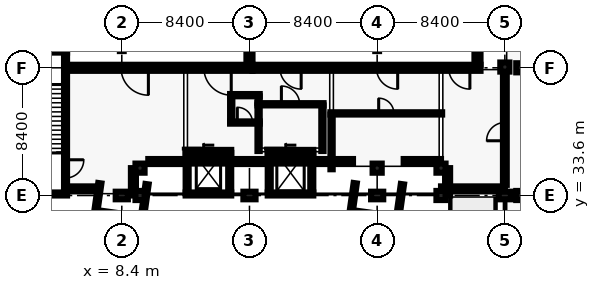
"""IFC4 building model, lengths in metres.
Left out: names, types, materials, properties, quantities, classifications, styles, units other than length and angle.
Written with IfcOpenShell. Run it as: python <this file> out.ifc"""

import sys

from ifc_helpers import new_model, si_unit, direction, frame, frame_2d, origin, origin_2d, place, context, subcontext, project, spatial, rectangle, extrude, element, fill, save


model = new_model("IFC4")
c1 = context("Model", 3, precision=1e-05, world=origin(), true_north=direction((0.0, 1.0)))
c2 = subcontext(c1, "Body", "Model", "MODEL_VIEW")
j1 = project(units=[si_unit("LENGTHUNIT", "METRE"), si_unit("PLANEANGLEUNIT", "RADIAN")], contexts=[c1])
p1 = place(None, origin())
s1 = spatial("IfcSite", under=j1, at=p1, CompositionType="ELEMENT")
p2 = place(p1, origin())
s2 = spatial("IfcBuilding", under=s1, at=p2, CompositionType="ELEMENT")
p3 = place(p2, frame((0.0, 0.0, 10.2)))
s3 = spatial("IfcBuildingStorey", under=s2, at=p3, CompositionType="ELEMENT", Elevation=10.2)
p4 = place(p3, frame((4.8, 33.7, 0.0), z_axis=(0.0, 0.0, 1.0), x_axis=(-1.0, 0.0, 0.0)))
e1 = element("IfcWall", 1, at=p4, inside=s3, PredefinedType="SHEAR", context=c2, shape_type="SweptSolid", body=[
    extrude(rectangle(XDim=4.8, YDim=0.2, at=frame_2d((2.4, 0.0))), origin(), (0.0, 0.0, 1.0), 4.8),
])
p5 = place(p3, frame((4.7, 43.0, 0.0), z_axis=(0.0, 0.0, 1.0), x_axis=(0.0, -1.0, 0.0)))
e2 = element("IfcWall", 2, at=p5, inside=s3, PredefinedType="SHEAR", context=c2, shape_type="SweptSolid", body=[
    extrude(rectangle(XDim=9.2, YDim=0.2, at=frame_2d((4.6, 0.0))), origin(), (0.0, 0.0, 1.0), 4.8),
])
p6 = place(p5, frame((7.05, 0.0, 0.0)))
e3 = element("IfcOpeningElement", 3, at=p6, cuts=e2, PredefinedType="OPENING", context=c2, shape_type="SweptSolid", body=[
    extrude(rectangle(XDim=1.2, YDim=2.1, at=frame_2d((0.6, 1.05))), frame((0.0, 0.11, 0.0), z_axis=(0.0, -1.0, 0.0), x_axis=(1.0, 0.0, 0.0)), (0.0, 0.0, 1.0), 0.22),
])
p7 = place(p3, frame((15.6, 33.7, 0.0), z_axis=(0.0, 0.0, 1.0), x_axis=(-1.0, 0.0, 0.0)))
e4 = element("IfcWall", 4, at=p7, inside=s3, PredefinedType="SHEAR", context=c2, shape_type="SweptSolid", body=[
    extrude(rectangle(XDim=3.0, YDim=0.2, at=frame_2d((1.5, 0.0))), origin(), (0.0, 0.0, 1.0), 4.8),
])
p8 = place(p3, frame((12.6, 36.5, 0.0), z_axis=(0.0, 0.0, 1.0), x_axis=(1.0, 0.0, 0.0)))
e5 = element("IfcWall", 5, at=p8, inside=s3, PredefinedType="SHEAR", context=c2, shape_type="SweptSolid", body=[
    extrude(rectangle(XDim=3.0, YDim=0.2, at=frame_2d((1.5, 0.0))), origin(), (0.0, 0.0, 1.0), 4.8),
])
p9 = place(p8, frame((0.95, 0.0, 0.0)))
e6 = element("IfcOpeningElement", 6, at=p9, cuts=e5, PredefinedType="OPENING", context=c2, shape_type="SweptSolid", body=[
    extrude(rectangle(XDim=1.1, YDim=2.1, at=frame_2d((0.55, 1.05))), frame((0.0, 0.11, 0.0), z_axis=(0.0, -1.0, 0.0), x_axis=(1.0, 0.0, 0.0)), (0.0, 0.0, 1.0), 0.22),
])
for number, where, z_axis, x_axis in (
    (7, (12.7, 33.8, 0.0), (0.0, 0.0, 1.0), (0.0, 1.0, 0.0)),
    (8, (15.5, 36.4, 0.0), (0.0, 0.0, 1.0), (0.0, -1.0, 0.0)),
):
    element("IfcWall", number, at=place(p3, frame(where, z_axis=z_axis, x_axis=x_axis)), inside=s3, PredefinedType="SHEAR", context=c2, shape_type="SweptSolid", body=[
        extrude(rectangle(XDim=2.6, YDim=0.2, at=frame_2d((1.3, 0.0))), origin(), (0.0, 0.0, 1.0), 4.8),
    ])
p10 = place(p3, frame((21.0, 33.7, 0.0), z_axis=(0.0, 0.0, 1.0), x_axis=(-1.0, 0.0, 0.0)))
e9 = element("IfcWall", 9, at=p10, inside=s3, PredefinedType="SHEAR", context=c2, shape_type="SweptSolid", body=[
    extrude(rectangle(XDim=3.0, YDim=0.2, at=frame_2d((1.5, 0.0))), origin(), (0.0, 0.0, 1.0), 4.8),
])
p11 = place(p3, frame((18.0, 36.5, 0.0), z_axis=(0.0, 0.0, 1.0), x_axis=(1.0, 0.0, 0.0)))
e10 = element("IfcWall", 10, at=p11, inside=s3, PredefinedType="SHEAR", context=c2, shape_type="SweptSolid", body=[
    extrude(rectangle(XDim=3.0, YDim=0.2, at=frame_2d((1.5, 0.0))), origin(), (0.0, 0.0, 1.0), 4.8),
])
p12 = place(p11, frame((0.95, 0.0, 0.0)))
e11 = element("IfcOpeningElement", 11, at=p12, cuts=e10, PredefinedType="OPENING", context=c2, shape_type="SweptSolid", body=[
    extrude(rectangle(XDim=1.1, YDim=2.1, at=frame_2d((0.55, 1.05))), frame((0.0, 0.11, 0.0), z_axis=(0.0, -1.0, 0.0), x_axis=(1.0, 0.0, 0.0)), (0.0, 0.0, 1.0), 0.22),
])
for number, where, z_axis, x_axis in (
    (12, (18.1, 33.8, 0.0), (0.0, 0.0, 1.0), (0.0, 1.0, 0.0)),
    (13, (20.9, 36.4, 0.0), (0.0, 0.0, 1.0), (0.0, -1.0, 0.0)),
):
    element("IfcWall", number, at=place(p3, frame(where, z_axis=z_axis, x_axis=x_axis)), inside=s3, PredefinedType="SHEAR", context=c2, shape_type="SweptSolid", body=[
        extrude(rectangle(XDim=2.6, YDim=0.2, at=frame_2d((1.3, 0.0))), origin(), (0.0, 0.0, 1.0), 4.8),
    ])
p13 = place(p3, frame((17.0, 42.0, 0.0), z_axis=(0.0, 0.0, 1.0), x_axis=(-1.0, 0.0, 0.0)))
e14 = element("IfcWall", 14, at=p13, inside=s3, PredefinedType="SHEAR", context=c2, shape_type="SweptSolid", body=[
    extrude(rectangle(XDim=12.2, YDim=0.4, at=frame_2d((6.1, 0.0))), origin(), (0.0, 0.0, 1.0), 4.8),
])
p14 = place(p13, frame((6.85, 0.0, 0.0)))
e15 = element("IfcOpeningElement", 15, at=p14, cuts=e14, PredefinedType="OPENING", context=c2, shape_type="SweptSolid", body=[
    extrude(rectangle(XDim=1.8, YDim=2.1, at=frame_2d((0.9, 1.05))), frame((0.0, 0.21, 0.0), z_axis=(0.0, -1.0, 0.0), x_axis=(1.0, 0.0, 0.0)), (0.0, 0.0, 1.0), 0.42),
])
p15 = place(p13, frame((1.4, 0.0, 0.0)))
e16 = element("IfcOpeningElement", 16, at=p15, cuts=e14, PredefinedType="OPENING", context=c2, shape_type="SweptSolid", body=[
    extrude(rectangle(XDim=1.8, YDim=2.1, at=frame_2d((0.9, 1.05))), frame((0.0, 0.21, 0.0), z_axis=(0.0, -1.0, 0.0), x_axis=(1.0, 0.0, 0.0)), (0.0, 0.0, 1.0), 0.42),
])
p16 = place(p3, frame((16.8, 58.6, 0.0), z_axis=(0.0, 0.0, 1.0), x_axis=(0.0, -1.0, 0.0)))
e17 = element("IfcWall", 17, at=p16, inside=s3, PredefinedType="SHEAR", context=c2, shape_type="SweptSolid", body=[
    extrude(rectangle(XDim=16.4, YDim=0.4, at=frame_2d((8.2, 0.0))), origin(), (0.0, 0.0, 1.0), 4.8),
])
p17 = place(p3, frame((32.0, 42.0, 0.0), z_axis=(0.0, 0.0, 1.0), x_axis=(-1.0, 0.0, 0.0)))
e18 = element("IfcWall", 18, at=p17, inside=s3, PredefinedType="SHEAR", context=c2, shape_type="SweptSolid", body=[
    extrude(rectangle(XDim=15.0, YDim=0.4, at=frame_2d((7.5, 0.0))), origin(), (0.0, 0.0, 1.0), 4.8),
])
p18 = place(p17, frame((0.7, 0.0, 0.0)))
e19 = element("IfcOpeningElement", 19, at=p18, cuts=e18, PredefinedType="OPENING", context=c2, shape_type="SweptSolid", body=[
    extrude(rectangle(XDim=1.4, YDim=2.1, at=frame_2d((0.7, 1.05))), frame((0.0, 0.21, 0.0), z_axis=(0.0, -1.0, 0.0), x_axis=(1.0, 0.0, 0.0)), (0.0, 0.0, 1.0), 0.42),
])
p19 = place(p17, frame((11.8, 0.0, 0.0)))
e20 = element("IfcOpeningElement", 20, at=p19, cuts=e18, PredefinedType="OPENING", context=c2, shape_type="SweptSolid", body=[
    extrude(rectangle(XDim=1.4, YDim=2.1, at=frame_2d((0.7, 1.05))), frame((0.0, 0.21, 0.0), z_axis=(0.0, -1.0, 0.0), x_axis=(1.0, 0.0, 0.0)), (0.0, 0.0, 1.0), 0.42),
])
p20 = place(p17, frame((5.45, 0.0, 0.0)))
e21 = element("IfcOpeningElement", 21, at=p20, cuts=e18, PredefinedType="OPENING", context=c2, shape_type="SweptSolid", body=[
    extrude(rectangle(XDim=1.4, YDim=2.1, at=frame_2d((0.7, 1.05))), frame((0.0, 0.21, 0.0), z_axis=(0.0, -1.0, 0.0), x_axis=(1.0, 0.0, 0.0)), (0.0, 0.0, 1.0), 0.42),
])
p21 = place(p3, frame((31.8, 57.6, 0.0), z_axis=(0.0, 0.0, 1.0), x_axis=(0.0, -1.0, 0.0)))
e22 = element("IfcWall", 22, at=p21, inside=s3, PredefinedType="SHEAR", context=c2, shape_type="SweptSolid", body=[
    extrude(rectangle(XDim=15.4, YDim=0.4, at=frame_2d((7.7, 0.0))), origin(), (0.0, 0.0, 1.0), 4.8),
])
for number, where, z_axis, x_axis in (
    (23, (8.4, 33.6, 0.0), (0.0, 0.0, 1.0), (1.0, 0.0, 0.0)),
    (24, (16.8, 33.6, 0.0), (0.0, 0.0, 1.0), (1.0, 0.0, 0.0)),
    (25, (25.2, 33.6, 0.0), (0.0, 0.0, 1.0), (1.0, 0.0, 0.0)),
    (26, (33.6, 33.6, 0.0), (0.0, 0.0, 1.0), (1.0, 0.0, 0.0)),
):
    element("IfcColumn", number, at=place(p3, frame(where, z_axis=z_axis, x_axis=x_axis)), inside=s3, PredefinedType="COLUMN", context=c2, shape_type="SweptSolid", body=[
        extrude(rectangle(XDim=0.8, YDim=0.5, at=origin_2d()), origin(), (0.0, 0.0, 1.0), 4.8),
    ])
for number, where, z_axis, x_axis in (
    (27, (34.65, 33.6, 0.0), (0.0, 0.0, 1.0), (1.0, 0.0, 0.0)),
    (28, (34.65, 42.0, 0.0), (0.0, 0.0, 1.0), (1.0, 0.0, 0.0)),
    (29, (33.6, 42.05, 0.0), (0.0, 0.0, 1.0), (1.0, 0.0, 0.0)),
    (30, (9.6, 35.4, 0.0), (0.0, 0.0, 1.0), (1.0, 0.0, 0.0)),
    (31, (9.601, 33.6, 0.0), (0.0, 0.0, 1.0), (1.0, 0.0, 0.0)),
    (32, (25.2, 35.399, 0.0), (0.0, 0.0, 1.0), (1.0, 0.0, 0.0)),
    (33, (29.399, 33.6, 0.0), (0.0, 0.0, 1.0), (1.0, 0.0, 0.0)),
    (34, (29.4, 35.4, 0.0), (0.0, 0.0, 1.0), (1.0, 0.0, 0.0)),
):
    element("IfcColumn", number, at=place(p3, frame(where, z_axis=z_axis, x_axis=x_axis)), inside=s3, PredefinedType="COLUMN", context=c2, shape_type="SweptSolid", body=[
        extrude(rectangle(XDim=0.6, YDim=0.6, at=origin_2d()), origin(), (0.0, 0.0, 1.0), 4.8),
    ])
p22 = place(p3, frame((6.956, 34.409, 0.0), z_axis=(0.0, 0.0, 1.0), x_axis=(-0.13918000587, -0.990267098295, 0.0)))
e35 = element("IfcWall", 35, at=p22, inside=s3, PredefinedType="SOLIDWALL", context=c2, shape_type="SweptSolid", body=[
    extrude(rectangle(XDim=1.8, YDim=0.215, at=frame_2d((0.9, 0.0))), origin(), (0.0, 0.0, 1.0), 4.5),
])
p23 = place(p3, frame((10.062, 34.345, 0.0), z_axis=(0.0, 0.0, 1.0), x_axis=(-0.139230687381, -0.99025997379, 0.0)))
e36 = element("IfcWall", 36, at=p23, inside=s3, PredefinedType="SOLIDWALL", context=c2, shape_type="SweptSolid", body=[
    extrude(rectangle(XDim=2.169, YDim=0.215, at=frame_2d((1.084, 0.0))), origin(), (0.0, 0.0, 1.0), 4.5),
])
p24 = place(p3, frame((23.756, 34.409, 0.0), z_axis=(0.0, 0.0, 1.0), x_axis=(-0.13918000587, -0.990267098295, 0.0)))
e37 = element("IfcWall", 37, at=p24, inside=s3, PredefinedType="SOLIDWALL", context=c2, shape_type="SweptSolid", body=[
    extrude(rectangle(XDim=1.8, YDim=0.215, at=frame_2d((0.9, 0.0))), origin(), (0.0, 0.0, 1.0), 4.5),
])
p25 = place(p3, frame((26.862, 34.345, 0.0), z_axis=(0.0, 0.0, 1.0), x_axis=(-0.139120311566, -0.990275486372, 0.0)))
e38 = element("IfcWall", 38, at=p25, inside=s3, PredefinedType="SOLIDWALL", context=c2, shape_type="SweptSolid", body=[
    extrude(rectangle(XDim=2.169, YDim=0.215, at=frame_2d((1.084, 0.0))), origin(), (0.0, 0.0, 1.0), 4.5),
])
p26 = place(p3, frame((6.776, 34.05, 0.0), z_axis=(0.0, 0.0, 1.0), x_axis=(-1.0, 0.0, 0.0)))
e39 = element("IfcWall", 39, at=p26, inside=s3, PredefinedType="SOLIDWALL", context=c2, shape_type="SweptSolid", body=[
    extrude(rectangle(XDim=1.976, YDim=0.3, at=frame_2d((0.988, 0.0))), origin(), (0.0, 0.0, 1.0), 4.5),
])
p27 = place(p3, frame((9.15, 35.4, 0.0), z_axis=(0.0, 0.0, 1.0), x_axis=(0.0, -1.0, 0.0)))
e40 = element("IfcWall", 40, at=p27, inside=s3, PredefinedType="SOLIDWALL", context=c2, shape_type="SweptSolid", body=[
    extrude(rectangle(XDim=1.8, YDim=0.3, at=frame_2d((0.9, 0.0))), origin(), (0.0, 0.0, 1.0), 4.5),
])
p28 = place(p3, frame((23.611, 35.85, 0.0), z_axis=(0.0, 0.0, 1.0), x_axis=(-1.0, 0.0, 0.0)))
e41 = element("IfcWall", 41, at=p28, inside=s3, PredefinedType="SOLIDWALL", context=c2, shape_type="SweptSolid", body=[
    extrude(rectangle(XDim=13.468, YDim=0.3, at=frame_2d((6.734, 0.0))), origin(), (0.0, 0.0, 1.0), 4.5),
])
p29 = place(p3, frame((29.4, 35.85, 0.0), z_axis=(0.0, 0.0, 1.0), x_axis=(-1.0, 0.0, 0.0)))
e42 = element("IfcWall", 42, at=p29, inside=s3, PredefinedType="SOLIDWALL", context=c2, shape_type="SweptSolid", body=[
    extrude(rectangle(XDim=2.456, YDim=0.3, at=frame_2d((1.228, 0.0))), origin(), (0.0, 0.0, 1.0), 4.5),
])
p30 = place(p3, frame((29.85, 33.6, 0.0), z_axis=(0.0, 0.0, 1.0), x_axis=(0.0, 1.0, 0.0)))
e43 = element("IfcWall", 43, at=p30, inside=s3, PredefinedType="SOLIDWALL", context=c2, shape_type="SweptSolid", body=[
    extrude(rectangle(XDim=1.8, YDim=0.3, at=frame_2d((0.9, 0.0))), origin(), (0.0, 0.0, 1.0), 4.5),
])
p31 = place(p3, frame((33.6, 34.05, 0.0), z_axis=(0.0, 0.0, 1.0), x_axis=(-1.0, 0.0, 0.0)))
e44 = element("IfcWall", 44, at=p31, inside=s3, PredefinedType="SOLIDWALL", context=c2, shape_type="SweptSolid", body=[
    extrude(rectangle(XDim=4.2, YDim=0.3, at=frame_2d((2.1, 0.0))), origin(), (0.0, 0.0, 1.0), 4.5),
])
p32 = place(p3, frame((33.6, 34.3, 0.0), z_axis=(0.0, 0.0, 1.0), x_axis=(0.0, 1.0, 0.0)))
e45 = element("IfcWall", 45, at=p32, inside=s3, PredefinedType="SOLIDWALL", context=c2, shape_type="SweptSolid", body=[
    extrude(rectangle(XDim=7.825, YDim=0.25, at=frame_2d((3.913, 0.0))), origin(), (0.0, 0.0, 1.0), 3.8),
])
p33 = place(p32, frame((2.9, 0.0, 0.0)))
e46 = element("IfcOpeningElement", 46, at=p33, cuts=e45, PredefinedType="OPENING", context=c2, shape_type="SweptSolid", body=[
    extrude(rectangle(XDim=1.2, YDim=2.1, at=frame_2d((0.6, 1.05))), frame((0.0, 0.135, 0.0), z_axis=(0.0, -1.0, 0.0), x_axis=(1.0, 0.0, 0.0)), (0.0, 0.0, 1.0), 0.27),
])
p34 = place(p3, frame((15.525, 38.4, 0.0), z_axis=(0.0, 0.0, 1.0), x_axis=(1.0, 0.0, 0.0)))
e47 = element("IfcWall", 47, at=p34, inside=s3, PredefinedType="PARTITIONING", context=c2, shape_type="SweptSolid", body=[
    extrude(rectangle(XDim=1.95, YDim=0.15, at=frame_2d((0.975, 0.0))), origin(), (0.0, 0.0, 1.0), 3.8),
])
p35 = place(p34, frame((0.475, 0.0, 0.0)))
e48 = element("IfcOpeningElement", 48, at=p35, cuts=e47, PredefinedType="OPENING", context=c2, shape_type="SweptSolid", body=[
    extrude(rectangle(XDim=1.0, YDim=2.1, at=frame_2d((0.5, 1.05))), frame((0.0, 0.085, 0.0), z_axis=(0.0, -1.0, 0.0), x_axis=(1.0, 0.0, 0.0)), (0.0, 0.0, 1.0), 0.17),
])
p36 = place(p3, frame((22.125, 39.0, 0.0), z_axis=(0.0, 0.0, 1.0), x_axis=(1.0, 0.0, 0.0)))
e49 = element("IfcWall", 49, at=p36, inside=s3, PredefinedType="PARTITIONING", context=c2, shape_type="SweptSolid", body=[
    extrude(rectangle(XDim=7.35, YDim=0.15, at=frame_2d((3.675, 0.0))), origin(), (0.0, 0.0, 1.0), 3.8),
])
p37 = place(p36, frame((3.175, 0.0, 0.0)))
e50 = element("IfcOpeningElement", 50, at=p37, cuts=e49, PredefinedType="OPENING", context=c2, shape_type="SweptSolid", body=[
    extrude(rectangle(XDim=1.0, YDim=2.1, at=frame_2d((0.5, 1.05))), frame((0.0, 0.085, 0.0), z_axis=(0.0, -1.0, 0.0), x_axis=(1.0, 0.0, 0.0)), (0.0, 0.0, 1.0), 0.17),
])
p38 = place(p3, frame((15.525, 40.2, 0.0), z_axis=(0.0, 0.0, 1.0), x_axis=(1.0, 0.0, 0.0)))
e51 = element("IfcWall", 51, at=p38, inside=s3, PredefinedType="PARTITIONING", context=c2, shape_type="SweptSolid", body=[
    extrude(rectangle(XDim=1.95, YDim=0.15, at=frame_2d((0.975, 0.0))), origin(), (0.0, 0.0, 1.0), 3.8),
])
p39 = place(p3, frame((17.325, 39.6, 0.0), z_axis=(0.0, 0.0, 1.0), x_axis=(1.0, 0.0, 0.0)))
e52 = element("IfcWall", 52, at=p39, inside=s3, PredefinedType="SOLIDWALL", context=c2, shape_type="SweptSolid", body=[
    extrude(rectangle(XDim=4.35, YDim=0.15, at=frame_2d((2.175, 0.0))), origin(), (0.0, 0.0, 1.0), 3.8),
])
p40 = place(p39, frame((1.575, 0.0, 0.0)))
e53 = element("IfcOpeningElement", 53, at=p40, cuts=e52, PredefinedType="OPENING", context=c2, shape_type="SweptSolid", body=[
    extrude(rectangle(XDim=1.2, YDim=2.1, at=frame_2d((0.6, 1.05))), frame((0.0, 0.085, 0.0), z_axis=(0.0, -1.0, 0.0), x_axis=(1.0, 0.0, 0.0)), (0.0, 0.0, 1.0), 0.17),
])
p41 = place(p3, frame((15.6, 38.475, 0.0), z_axis=(0.0, 0.0, 1.0), x_axis=(0.0, 1.0, 0.0)))
e54 = element("IfcWall", 54, at=p41, inside=s3, PredefinedType="PARTITIONING", context=c2, shape_type="SweptSolid", body=[
    extrude(rectangle(XDim=1.65, YDim=0.15, at=frame_2d((0.825, 0.0))), origin(), (0.0, 0.0, 1.0), 4.5),
])
p42 = place(p3, frame((17.4, 39.675, 0.0), z_axis=(0.0, 0.0, 1.0), x_axis=(0.0, 1.0, 0.0)))
e55 = element("IfcWall", 55, at=p42, inside=s3, PredefinedType="PARTITIONING", context=c2, shape_type="SweptSolid", body=[
    extrude(rectangle(XDim=0.45, YDim=0.15, at=frame_2d((0.225, 0.0))), origin(), (0.0, 0.0, 1.0), 4.5),
])
p43 = place(p3, frame((22.2, 35.325, 0.0), z_axis=(0.0, 0.0, 1.0), x_axis=(0.0, 1.0, 0.0)))
e56 = element("IfcWall", 56, at=p43, inside=s3, PredefinedType="PARTITIONING", context=c2, shape_type="SweptSolid", body=[
    extrude(rectangle(XDim=0.375, YDim=0.15, at=frame_2d((0.188, 0.0))), origin(), (0.0, 0.0, 1.0), 4.0),
])
p44 = place(p3, frame((22.2, 36.0, 0.0), z_axis=(0.0, 0.0, 1.0), x_axis=(0.0, 1.0, 0.0)))
e57 = element("IfcWall", 57, at=p44, inside=s3, PredefinedType="PARTITIONING", context=c2, shape_type="SweptSolid", body=[
    extrude(rectangle(XDim=2.925, YDim=0.15, at=frame_2d((1.462, 0.0))), origin(), (0.0, 0.0, 1.0), 4.5),
])
p45 = place(p3, frame((17.4, 36.525, 0.0), z_axis=(0.0, 0.0, 1.0), x_axis=(0.0, 1.0, 0.0)))
e58 = element("IfcWall", 58, at=p45, inside=s3, PredefinedType="SOLIDWALL", context=c2, shape_type="SweptSolid", body=[
    extrude(rectangle(XDim=1.8, YDim=0.15, at=frame_2d((0.9, 0.0))), origin(), (0.0, 0.0, 1.0), 4.5),
])
p46 = place(p3, frame((17.4, 38.475, 0.0), z_axis=(0.0, 0.0, 1.0), x_axis=(0.0, 1.0, 0.0)))
e59 = element("IfcWall", 59, at=p46, inside=s3, PredefinedType="SOLIDWALL", context=c2, shape_type="SweptSolid", body=[
    extrude(rectangle(XDim=1.05, YDim=0.15, at=frame_2d((0.525, 0.0))), origin(), (0.0, 0.0, 1.0), 4.5),
])
p47 = place(p3, frame((21.6, 36.525, 0.0), z_axis=(0.0, 0.0, 1.0), x_axis=(0.0, 1.0, 0.0)))
e60 = element("IfcWall", 60, at=p47, inside=s3, PredefinedType="SOLIDWALL", context=c2, shape_type="SweptSolid", body=[
    extrude(rectangle(XDim=3.0, YDim=0.15, at=frame_2d((1.5, 0.0))), origin(), (0.0, 0.0, 1.0), 4.5),
])
p48 = place(p9, origin())
e61 = element("IfcDoor", 61, at=p48, inside=s3, OperationType="SLIDING_TO_LEFT", PredefinedType="DOOR", context=c2, shape_type="SweptSolid", body=[
    extrude(rectangle(XDim=1.1, YDim=2.1, at=frame_2d((0.55, 1.05))), frame((0.0, 0.025, 0.0), z_axis=(0.0, -1.0, 0.0), x_axis=(1.0, 0.0, 0.0)), (0.0, 0.0, 1.0), 0.05),
])
fill(e6, e61)
p49 = place(p12, origin())
e62 = element("IfcDoor", 62, at=p49, inside=s3, OperationType="SLIDING_TO_LEFT", PredefinedType="DOOR", context=c2, shape_type="SweptSolid", body=[
    extrude(rectangle(XDim=1.1, YDim=2.1, at=frame_2d((0.55, 1.05))), frame((0.0, 0.025, 0.0), z_axis=(0.0, -1.0, 0.0), x_axis=(1.0, 0.0, 0.0)), (0.0, 0.0, 1.0), 0.05),
])
fill(e11, e62)
p50 = place(p6, origin())
e63 = element("IfcDoor", 63, at=p50, inside=s3, OperationType="SINGLE_SWING_LEFT", PredefinedType="DOOR", context=c2, shape_type="SweptSolid", body=[
    extrude(rectangle(XDim=1.2, YDim=2.1, at=frame_2d((0.6, 1.05))), frame((0.0, 0.025, 0.0), z_axis=(0.0, -1.0, 0.0), x_axis=(1.0, 0.0, 0.0)), (0.0, 0.0, 1.0), 0.05),
])
fill(e3, e63)
p51 = place(p33, origin())
e64 = element("IfcDoor", 64, at=p51, inside=s3, OperationType="SINGLE_SWING_LEFT", PredefinedType="DOOR", context=c2, shape_type="SweptSolid", body=[
    extrude(rectangle(XDim=1.2, YDim=2.1, at=frame_2d((0.6, 1.05))), frame((0.0, 0.025, 0.0), z_axis=(0.0, -1.0, 0.0), x_axis=(1.0, 0.0, 0.0)), (0.0, 0.0, 1.0), 0.05),
])
fill(e46, e64)
p52 = place(p14, origin())
e65 = element("IfcDoor", 65, at=p52, inside=s3, OperationType="DOUBLE_DOOR_SINGLE_SWING", PredefinedType="DOOR", context=c2, shape_type="SweptSolid", body=[
    extrude(rectangle(XDim=1.8, YDim=2.1, at=frame_2d((0.9, 1.05))), frame((0.0, 0.025, 0.0), z_axis=(0.0, -1.0, 0.0), x_axis=(1.0, 0.0, 0.0)), (0.0, 0.0, 1.0), 0.05),
])
fill(e15, e65)
p53 = place(p18, origin())
e66 = element("IfcDoor", 66, at=p53, inside=s3, OperationType="DOUBLE_DOOR_SINGLE_SWING", PredefinedType="DOOR", context=c2, shape_type="SweptSolid", body=[
    extrude(rectangle(XDim=1.4, YDim=2.1, at=frame_2d((0.7, 1.05))), frame((0.0, 0.025, 0.0), z_axis=(0.0, -1.0, 0.0), x_axis=(1.0, 0.0, 0.0)), (0.0, 0.0, 1.0), 0.05),
])
fill(e19, e66)
p54 = place(p40, origin())
e67 = element("IfcDoor", 67, at=p54, inside=s3, OperationType="SINGLE_SWING_RIGHT", PredefinedType="DOOR", context=c2, shape_type="SweptSolid", body=[
    extrude(rectangle(XDim=1.2, YDim=2.1, at=frame_2d((0.6, 1.05))), frame((0.0, 0.025, 0.0), z_axis=(0.0, -1.0, 0.0), x_axis=(1.0, 0.0, 0.0)), (0.0, 0.0, 1.0), 0.05),
])
fill(e53, e67)
p55 = place(p35, origin())
e68 = element("IfcDoor", 68, at=p55, inside=s3, OperationType="SINGLE_SWING_RIGHT", PredefinedType="DOOR", context=c2, shape_type="SweptSolid", body=[
    extrude(rectangle(XDim=1.0, YDim=2.1, at=frame_2d((0.5, 1.05))), frame((0.0, 0.025, 0.0), z_axis=(0.0, -1.0, 0.0), x_axis=(1.0, 0.0, 0.0)), (0.0, 0.0, 1.0), 0.05),
])
fill(e48, e68)
p56 = place(p37, origin())
e69 = element("IfcDoor", 69, at=p56, inside=s3, OperationType="SINGLE_SWING_LEFT", PredefinedType="DOOR", context=c2, shape_type="SweptSolid", body=[
    extrude(rectangle(XDim=1.0, YDim=2.1, at=frame_2d((0.5, 1.05))), frame((0.0, 0.025, 0.0), z_axis=(0.0, -1.0, 0.0), x_axis=(1.0, 0.0, 0.0)), (0.0, 0.0, 1.0), 0.05),
])
fill(e50, e69)
p57 = place(p15, origin())
e70 = element("IfcDoor", 70, at=p57, inside=s3, OperationType="DOUBLE_DOOR_SINGLE_SWING", PredefinedType="DOOR", context=c2, shape_type="SweptSolid", body=[
    extrude(rectangle(XDim=1.8, YDim=2.1, at=frame_2d((0.9, 1.05))), frame((0.0, 0.025, 0.0), z_axis=(0.0, -1.0, 0.0), x_axis=(1.0, 0.0, 0.0)), (0.0, 0.0, 1.0), 0.05),
])
fill(e16, e70)
p58 = place(p19, origin())
e71 = element("IfcDoor", 71, at=p58, inside=s3, OperationType="DOUBLE_DOOR_SINGLE_SWING", PredefinedType="DOOR", context=c2, shape_type="SweptSolid", body=[
    extrude(rectangle(XDim=1.4, YDim=2.1, at=frame_2d((0.7, 1.05))), frame((0.0, 0.025, 0.0), z_axis=(0.0, -1.0, 0.0), x_axis=(1.0, 0.0, 0.0)), (0.0, 0.0, 1.0), 0.05),
])
fill(e20, e71)
p59 = place(p20, origin())
e72 = element("IfcDoor", 72, at=p59, inside=s3, OperationType="DOUBLE_DOOR_SINGLE_SWING", PredefinedType="DOOR", context=c2, shape_type="SweptSolid", body=[
    extrude(rectangle(XDim=1.4, YDim=2.1, at=frame_2d((0.7, 1.05))), frame((0.0, 0.025, 0.0), z_axis=(0.0, -1.0, 0.0), x_axis=(1.0, 0.0, 0.0)), (0.0, 0.0, 1.0), 0.05),
])
fill(e21, e72)
save(model, sys.argv[1])
